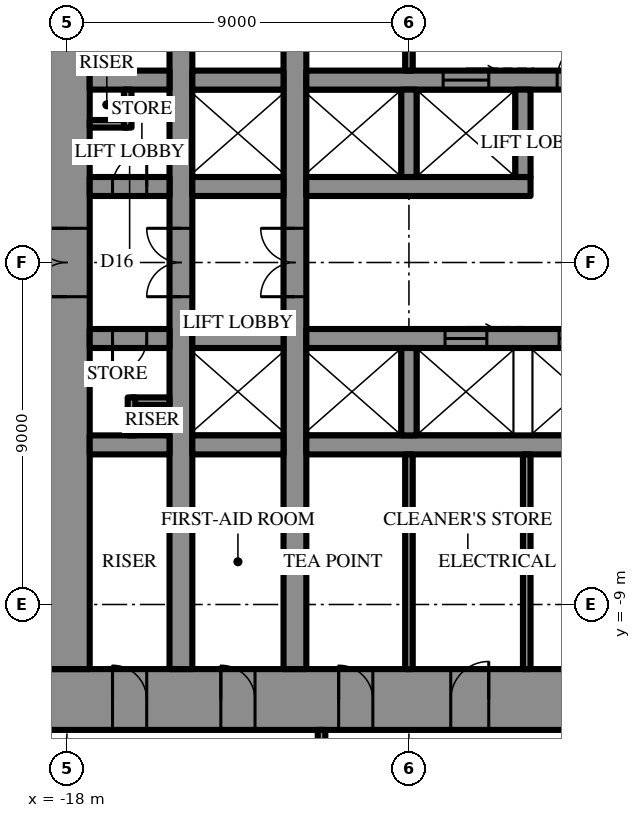
"""IFC4 building model, lengths in metres.
Left out: names, types, materials, properties, quantities, classifications, styles, units other than length and angle.
Written with IfcOpenShell. Run it as: python <this file> out.ifc"""

import sys

from ifc_helpers import new_model, si_unit, direction, frame, frame_2d, origin, place, context, subcontext, project, spatial, rectangle, extrude, element, fill, save


model = new_model("IFC4")
c1 = context("Model", 3, precision=1e-05, world=origin(), true_north=direction((0.0, 1.0)))
c2 = subcontext(c1, "Body", "Model", "MODEL_VIEW")
j1 = project(units=[si_unit("LENGTHUNIT", "METRE"), si_unit("PLANEANGLEUNIT", "RADIAN")], contexts=[c1])
p1 = place(None, origin())
s1 = spatial("IfcSite", under=j1, at=p1, CompositionType="ELEMENT")
p2 = place(p1, origin())
s2 = spatial("IfcBuilding", under=s1, at=p2, CompositionType="ELEMENT")
p3 = place(p2, frame((0.0, 0.0, 186.7)))
s3 = spatial("IfcBuildingStorey", under=s2, at=p3, CompositionType="ELEMENT", Elevation=186.7)
p4 = place(p3, frame((18.6, -11.5, 0.0), z_axis=(0.0, 0.0, 1.0), x_axis=(-1.0, 0.0, 0.0)))
e1 = element("IfcWall", 1, at=p4, inside=s3, PredefinedType="SHEAR", context=c2, shape_type="SweptSolid", body=[
    extrude(rectangle(XDim=37.2, YDim=1.6, at=frame_2d((18.6, 0.0))), origin(), (0.0, 0.0, 1.0), 4.2),
])
p5 = place(p4, frame((19.45, 0.0, 0.0)))
e2 = element("IfcOpeningElement", 2, at=p5, cuts=e1, PredefinedType="OPENING", context=c2, shape_type="SweptSolid", body=[
    extrude(rectangle(XDim=0.9, YDim=2.2, at=frame_2d((0.45, 1.1))), frame((0.0, 0.81, 0.0), z_axis=(0.0, -1.0, 0.0), x_axis=(1.0, 0.0, 0.0)), (0.0, 0.0, 1.0), 1.62),
])
p6 = place(p4, frame((22.45, 0.0, 0.0)))
e3 = element("IfcOpeningElement", 3, at=p6, cuts=e1, PredefinedType="OPENING", context=c2, shape_type="SweptSolid", body=[
    extrude(rectangle(XDim=0.9, YDim=2.2, at=frame_2d((0.45, 1.1))), frame((0.0, 0.81, 0.0), z_axis=(0.0, -1.0, 0.0), x_axis=(1.0, 0.0, 0.0)), (0.0, 0.0, 1.0), 1.62),
])
p7 = place(p4, frame((25.5, 0.0, 0.0)))
e4 = element("IfcOpeningElement", 4, at=p7, cuts=e1, PredefinedType="OPENING", context=c2, shape_type="SweptSolid", body=[
    extrude(rectangle(XDim=1.0, YDim=2.2, at=frame_2d((0.5, 1.1))), frame((0.0, 0.81, 0.0), z_axis=(0.0, -1.0, 0.0), x_axis=(1.0, 0.0, 0.0)), (0.0, 0.0, 1.0), 1.62),
])
p8 = place(p4, frame((1.8, 0.0, 0.0)))
e5 = element("IfcOpeningElement", 5, at=p8, cuts=e1, PredefinedType="OPENING", context=c2, shape_type="SweptSolid", body=[
    extrude(rectangle(XDim=0.9, YDim=2.2, at=frame_2d((0.45, 1.1))), frame((0.0, 0.81, 0.0), z_axis=(0.0, -1.0, 0.0), x_axis=(1.0, 0.0, 0.0)), (0.0, 0.0, 1.0), 1.62),
])
p9 = place(p4, frame((4.65, 0.0, 0.0)))
e6 = element("IfcOpeningElement", 6, at=p9, cuts=e1, PredefinedType="OPENING", context=c2, shape_type="SweptSolid", body=[
    extrude(rectangle(XDim=0.9, YDim=2.2, at=frame_2d((0.45, 1.1))), frame((0.0, 0.81, 0.0), z_axis=(0.0, -1.0, 0.0), x_axis=(1.0, 0.0, 0.0)), (0.0, 0.0, 1.0), 1.62),
])
p10 = place(p4, frame((7.75, 0.0, 0.0)))
e7 = element("IfcOpeningElement", 7, at=p10, cuts=e1, PredefinedType="OPENING", context=c2, shape_type="SweptSolid", body=[
    extrude(rectangle(XDim=0.9, YDim=2.2, at=frame_2d((0.45, 1.1))), frame((0.0, 0.81, 0.0), z_axis=(0.0, -1.0, 0.0), x_axis=(1.0, 0.0, 0.0)), (0.0, 0.0, 1.0), 1.62),
])
p11 = place(p4, frame((28.55, 0.0, 0.0)))
e8 = element("IfcOpeningElement", 8, at=p11, cuts=e1, PredefinedType="OPENING", context=c2, shape_type="SweptSolid", body=[
    extrude(rectangle(XDim=0.9, YDim=2.2, at=frame_2d((0.45, 1.1))), frame((0.0, 0.81, 0.0), z_axis=(0.0, -1.0, 0.0), x_axis=(1.0, 0.0, 0.0)), (0.0, 0.0, 1.0), 1.62),
])
p12 = place(p4, frame((31.65, 0.0, 0.0)))
e9 = element("IfcOpeningElement", 9, at=p12, cuts=e1, PredefinedType="OPENING", context=c2, shape_type="SweptSolid", body=[
    extrude(rectangle(XDim=0.9, YDim=2.2, at=frame_2d((0.45, 1.1))), frame((0.0, 0.81, 0.0), z_axis=(0.0, -1.0, 0.0), x_axis=(1.0, 0.0, 0.0)), (0.0, 0.0, 1.0), 1.62),
])
p13 = place(p4, frame((34.5, 0.0, 0.0)))
e10 = element("IfcOpeningElement", 10, at=p13, cuts=e1, PredefinedType="OPENING", context=c2, shape_type="SweptSolid", body=[
    extrude(rectangle(XDim=0.9, YDim=2.2, at=frame_2d((0.45, 1.1))), frame((0.0, 0.81, 0.0), z_axis=(0.0, -1.0, 0.0), x_axis=(1.0, 0.0, 0.0)), (0.0, 0.0, 1.0), 1.62),
])
p14 = place(p3, frame((-18.0, 10.7, 0.0), z_axis=(0.0, 0.0, 1.0), x_axis=(0.0, -1.0, 0.0)))
e11 = element("IfcWall", 11, at=p14, inside=s3, PredefinedType="SHEAR", context=c2, shape_type="SweptSolid", body=[
    extrude(rectangle(XDim=21.4, YDim=1.2, at=frame_2d((10.7, 0.0))), origin(), (0.0, 0.0, 1.0), 4.2),
])
p15 = place(p14, frame((9.8, 0.0, 0.0)))
e12 = element("IfcOpeningElement", 12, at=p15, cuts=e11, PredefinedType="OPENING", context=c2, shape_type="SweptSolid", body=[
    extrude(rectangle(XDim=1.8, YDim=2.4, at=frame_2d((0.9, 1.2))), frame((0.0, 0.61, 0.0), z_axis=(0.0, -1.0, 0.0), x_axis=(1.0, 0.0, 0.0)), (0.0, 0.0, 1.0), 1.22),
])
p16 = place(p3, frame((-12.0, -10.7, 0.0), z_axis=(0.0, 0.0, 1.0), x_axis=(0.0, 1.0, 0.0)))
e13 = element("IfcWall", 13, at=p16, inside=s3, PredefinedType="SHEAR", context=c2, shape_type="SweptSolid", body=[
    extrude(rectangle(XDim=21.4, YDim=0.6, at=frame_2d((10.7, 0.0))), origin(), (0.0, 0.0, 1.0), 4.2),
])
p17 = place(p16, frame((9.8, 0.0, 0.0)))
e14 = element("IfcOpeningElement", 14, at=p17, cuts=e13, PredefinedType="OPENING", context=c2, shape_type="SweptSolid", body=[
    extrude(rectangle(XDim=1.8, YDim=2.4, at=frame_2d((0.9, 1.2))), frame((0.0, 0.31, 0.0), z_axis=(0.0, -1.0, 0.0), x_axis=(1.0, 0.0, 0.0)), (0.0, 0.0, 1.0), 0.62),
])
p18 = place(p3, frame((-15.0, -10.7, 0.0), z_axis=(0.0, 0.0, 1.0), x_axis=(0.0, 1.0, 0.0)))
e15 = element("IfcWall", 15, at=p18, inside=s3, PredefinedType="SHEAR", context=c2, shape_type="SweptSolid", body=[
    extrude(rectangle(XDim=21.4, YDim=0.6, at=frame_2d((10.7, 0.0))), origin(), (0.0, 0.0, 1.0), 4.2),
])
p19 = place(p18, frame((9.8, 0.0, 0.0)))
e16 = element("IfcOpeningElement", 16, at=p19, cuts=e15, PredefinedType="OPENING", context=c2, shape_type="SweptSolid", body=[
    extrude(rectangle(XDim=1.8, YDim=2.4, at=frame_2d((0.9, 1.2))), frame((0.0, 0.31, 0.0), z_axis=(0.0, -1.0, 0.0), x_axis=(1.0, 0.0, 0.0)), (0.0, 0.0, 1.0), 0.62),
])
p20 = place(p3, frame((-17.4, 2.0, 0.0), z_axis=(0.0, 0.0, 1.0), x_axis=(1.0, 0.0, 0.0)))
e17 = element("IfcWall", 17, at=p20, inside=s3, PredefinedType="SHEAR", context=c2, shape_type="SweptSolid", body=[
    extrude(rectangle(XDim=2.1, YDim=0.5, at=frame_2d((1.05, 0.0))), origin(), (0.0, 0.0, 1.0), 4.2),
])
p21 = place(p20, frame((0.6, 0.0, 0.0)))
e18 = element("IfcOpeningElement", 18, at=p21, cuts=e17, PredefinedType="OPENING", context=c2, shape_type="SweptSolid", body=[
    extrude(rectangle(XDim=0.9, YDim=2.2, at=frame_2d((0.45, 1.1))), frame((0.0, 0.26, 0.0), z_axis=(0.0, -1.0, 0.0), x_axis=(1.0, 0.0, 0.0)), (0.0, 0.0, 1.0), 0.52),
])
p22 = place(p3, frame((-14.7, 2.0, 0.0), z_axis=(0.0, 0.0, 1.0), x_axis=(1.0, 0.0, 0.0)))
e19 = element("IfcWall", 19, at=p22, inside=s3, PredefinedType="SHEAR", context=c2, shape_type="SweptSolid", body=[
    extrude(rectangle(XDim=2.4, YDim=0.5, at=frame_2d((1.2, 0.0))), origin(), (0.0, 0.0, 1.0), 4.2),
])
p23 = place(p3, frame((-11.7, 2.0, 0.0), z_axis=(0.0, 0.0, 1.0), x_axis=(1.0, 0.0, 0.0)))
e20 = element("IfcWall", 20, at=p23, inside=s3, PredefinedType="SHEAR", context=c2, shape_type="SweptSolid", body=[
    extrude(rectangle(XDim=5.9, YDim=0.5, at=frame_2d((2.95, 0.0))), origin(), (0.0, 0.0, 1.0), 4.2),
])
p24 = place(p3, frame((-17.4, 4.8, 0.0), z_axis=(0.0, 0.0, 1.0), x_axis=(1.0, 0.0, 0.0)))
e21 = element("IfcWall", 21, at=p24, inside=s3, PredefinedType="SHEAR", context=c2, shape_type="SweptSolid", body=[
    extrude(rectangle(XDim=2.1, YDim=0.5, at=frame_2d((1.05, 0.0))), origin(), (0.0, 0.0, 1.0), 4.2),
])
p25 = place(p3, frame((-14.7, 4.8, 0.0), z_axis=(0.0, 0.0, 1.0), x_axis=(1.0, 0.0, 0.0)))
e22 = element("IfcWall", 22, at=p25, inside=s3, PredefinedType="SHEAR", context=c2, shape_type="SweptSolid", body=[
    extrude(rectangle(XDim=2.4, YDim=0.5, at=frame_2d((1.2, 0.0))), origin(), (0.0, 0.0, 1.0), 4.2),
])
p26 = place(p3, frame((-11.7, 4.8, 0.0), z_axis=(0.0, 0.0, 1.0), x_axis=(1.0, 0.0, 0.0)))
e23 = element("IfcWall", 23, at=p26, inside=s3, PredefinedType="SHEAR", context=c2, shape_type="SweptSolid", body=[
    extrude(rectangle(XDim=23.4, YDim=0.5, at=frame_2d((11.7, 0.0))), origin(), (0.0, 0.0, 1.0), 4.2),
])
p27 = place(p26, frame((6.6, 0.0, 0.0)))
e24 = element("IfcOpeningElement", 24, at=p27, cuts=e23, PredefinedType="OPENING", context=c2, shape_type="SweptSolid", body=[
    extrude(rectangle(XDim=1.2, YDim=2.2, at=frame_2d((0.6, 1.1))), frame((0.0, 0.26, 0.0), z_axis=(0.0, -1.0, 0.0), x_axis=(1.0, 0.0, 0.0)), (0.0, 0.0, 1.0), 0.52),
])
p28 = place(p26, frame((3.6, 0.0, 0.0)))
e25 = element("IfcOpeningElement", 25, at=p28, cuts=e23, PredefinedType="OPENING", context=c2, shape_type="SweptSolid", body=[
    extrude(rectangle(XDim=1.2, YDim=2.2, at=frame_2d((0.6, 1.1))), frame((0.0, 0.26, 0.0), z_axis=(0.0, -1.0, 0.0), x_axis=(1.0, 0.0, 0.0)), (0.0, 0.0, 1.0), 0.52),
])
for number, where, z_axis, x_axis in (
    (26, (-9.0, 2.25, 0.0), (0.0, 0.0, 1.0), (0.0, 1.0, 0.0)),
    (27, (-6.0, 2.25, 0.0), (0.0, 0.0, 1.0), (0.0, 1.0, 0.0)),
):
    element("IfcWall", number, at=place(p3, frame(where, z_axis=z_axis, x_axis=x_axis)), inside=s3, PredefinedType="SHEAR", context=c2, shape_type="SweptSolid", body=[
        extrude(rectangle(XDim=2.3, YDim=0.4, at=frame_2d((1.15, 0.0))), origin(), (0.0, 0.0, 1.0), 4.2),
    ])
p29 = place(p3, frame((3.2, -2.0, 0.0), z_axis=(0.0, 0.0, 1.0), x_axis=(-1.0, 0.0, 0.0)))
e28 = element("IfcWall", 28, at=p29, inside=s3, PredefinedType="SHEAR", context=c2, shape_type="SweptSolid", body=[
    extrude(rectangle(XDim=14.9, YDim=0.5, at=frame_2d((7.45, 0.0))), origin(), (0.0, 0.0, 1.0), 4.2),
])
p30 = place(p29, frame((1.15, 0.0, 0.0)))
e29 = element("IfcOpeningElement", 29, at=p30, cuts=e28, PredefinedType="OPENING", context=c2, shape_type="SweptSolid", body=[
    extrude(rectangle(XDim=1.1, YDim=2.2, at=frame_2d((0.55, 1.1))), frame((0.0, 0.26, 0.0), z_axis=(0.0, -1.0, 0.0), x_axis=(1.0, 0.0, 0.0)), (0.0, 0.0, 1.0), 0.52),
])
p31 = place(p29, frame((4.15, 0.0, 0.0)))
e30 = element("IfcOpeningElement", 30, at=p31, cuts=e28, PredefinedType="OPENING", context=c2, shape_type="SweptSolid", body=[
    extrude(rectangle(XDim=1.1, YDim=2.2, at=frame_2d((0.55, 1.1))), frame((0.0, 0.26, 0.0), z_axis=(0.0, -1.0, 0.0), x_axis=(1.0, 0.0, 0.0)), (0.0, 0.0, 1.0), 0.52),
])
p32 = place(p29, frame((7.15, 0.0, 0.0)))
e31 = element("IfcOpeningElement", 31, at=p32, cuts=e28, PredefinedType="OPENING", context=c2, shape_type="SweptSolid", body=[
    extrude(rectangle(XDim=1.1, YDim=2.2, at=frame_2d((0.55, 1.1))), frame((0.0, 0.26, 0.0), z_axis=(0.0, -1.0, 0.0), x_axis=(1.0, 0.0, 0.0)), (0.0, 0.0, 1.0), 0.52),
])
p33 = place(p29, frame((10.15, 0.0, 0.0)))
e32 = element("IfcOpeningElement", 32, at=p33, cuts=e28, PredefinedType="OPENING", context=c2, shape_type="SweptSolid", body=[
    extrude(rectangle(XDim=1.1, YDim=2.2, at=frame_2d((0.55, 1.1))), frame((0.0, 0.26, 0.0), z_axis=(0.0, -1.0, 0.0), x_axis=(1.0, 0.0, 0.0)), (0.0, 0.0, 1.0), 0.52),
])
p34 = place(p3, frame((-12.3, -2.0, 0.0), z_axis=(0.0, 0.0, 1.0), x_axis=(-1.0, 0.0, 0.0)))
e33 = element("IfcWall", 33, at=p34, inside=s3, PredefinedType="SHEAR", context=c2, shape_type="SweptSolid", body=[
    extrude(rectangle(XDim=2.4, YDim=0.5, at=frame_2d((1.2, 0.0))), origin(), (0.0, 0.0, 1.0), 4.2),
])
p35 = place(p3, frame((-15.3, -2.0, 0.0), z_axis=(0.0, 0.0, 1.0), x_axis=(-1.0, 0.0, 0.0)))
e34 = element("IfcWall", 34, at=p35, inside=s3, PredefinedType="SHEAR", context=c2, shape_type="SweptSolid", body=[
    extrude(rectangle(XDim=2.1, YDim=0.5, at=frame_2d((1.05, 0.0))), origin(), (0.0, 0.0, 1.0), 4.2),
])
p36 = place(p35, frame((0.6, 0.0, 0.0)))
e35 = element("IfcOpeningElement", 35, at=p36, cuts=e34, PredefinedType="OPENING", context=c2, shape_type="SweptSolid", body=[
    extrude(rectangle(XDim=0.9, YDim=2.2, at=frame_2d((0.45, 1.1))), frame((0.0, 0.26, 0.0), z_axis=(0.0, -1.0, 0.0), x_axis=(1.0, 0.0, 0.0)), (0.0, 0.0, 1.0), 0.52),
])
p37 = place(p3, frame((11.7, -4.8, 0.0), z_axis=(0.0, 0.0, 1.0), x_axis=(-1.0, 0.0, 0.0)))
e36 = element("IfcWall", 36, at=p37, inside=s3, PredefinedType="SHEAR", context=c2, shape_type="SweptSolid", body=[
    extrude(rectangle(XDim=23.4, YDim=0.5, at=frame_2d((11.7, 0.0))), origin(), (0.0, 0.0, 1.0), 4.2),
])
p38 = place(p37, frame((6.6, 0.0, 0.0)))
e37 = element("IfcOpeningElement", 37, at=p38, cuts=e36, PredefinedType="OPENING", context=c2, shape_type="SweptSolid", body=[
    extrude(rectangle(XDim=1.2, YDim=2.2, at=frame_2d((0.6, 1.1))), frame((0.0, 0.26, 0.0), z_axis=(0.0, -1.0, 0.0), x_axis=(1.0, 0.0, 0.0)), (0.0, 0.0, 1.0), 0.52),
])
p39 = place(p37, frame((3.6, 0.0, 0.0)))
e38 = element("IfcOpeningElement", 38, at=p39, cuts=e36, PredefinedType="OPENING", context=c2, shape_type="SweptSolid", body=[
    extrude(rectangle(XDim=1.2, YDim=2.2, at=frame_2d((0.6, 1.1))), frame((0.0, 0.26, 0.0), z_axis=(0.0, -1.0, 0.0), x_axis=(1.0, 0.0, 0.0)), (0.0, 0.0, 1.0), 0.52),
])
p40 = place(p3, frame((-12.3, -4.8, 0.0), z_axis=(0.0, 0.0, 1.0), x_axis=(-1.0, 0.0, 0.0)))
e39 = element("IfcWall", 39, at=p40, inside=s3, PredefinedType="SHEAR", context=c2, shape_type="SweptSolid", body=[
    extrude(rectangle(XDim=2.4, YDim=0.5, at=frame_2d((1.2, 0.0))), origin(), (0.0, 0.0, 1.0), 4.2),
])
p41 = place(p3, frame((-15.3, -4.8, 0.0), z_axis=(0.0, 0.0, 1.0), x_axis=(-1.0, 0.0, 0.0)))
e40 = element("IfcWall", 40, at=p41, inside=s3, PredefinedType="SHEAR", context=c2, shape_type="SweptSolid", body=[
    extrude(rectangle(XDim=2.1, YDim=0.5, at=frame_2d((1.05, 0.0))), origin(), (0.0, 0.0, 1.0), 4.2),
])
p42 = place(p3, frame((-9.0, -2.25, 0.0), z_axis=(0.0, 0.0, 1.0), x_axis=(0.0, -1.0, 0.0)))
e41 = element("IfcWall", 41, at=p42, inside=s3, PredefinedType="SHEAR", context=c2, shape_type="SweptSolid", body=[
    extrude(rectangle(XDim=2.3, YDim=0.4, at=frame_2d((1.15, 0.0))), origin(), (0.0, 0.0, 1.0), 4.2),
])
for number, where, z_axis, x_axis in (
    (42, (-9.0, 5.05, 0.0), (0.0, 0.0, 1.0), (0.0, 1.0, 0.0)),
    (43, (-9.0, -5.05, 0.0), (0.0, 0.0, 1.0), (0.0, -1.0, 0.0)),
    (44, (-5.9, -5.05, 0.0), (0.0, 0.0, 1.0), (0.0, -1.0, 0.0)),
):
    element("IfcWall", number, at=place(p3, frame(where, z_axis=z_axis, x_axis=x_axis)), inside=s3, PredefinedType="PARTITIONING", context=c2, shape_type="SweptSolid", body=[
        extrude(rectangle(XDim=5.65, YDim=0.2, at=frame_2d((2.825, 0.0))), origin(), (0.0, 0.0, 1.0), 4.0),
    ])
for number, where, z_axis, x_axis in (
    (45, (-17.4, 3.65, 0.0), (0.0, 0.0, 1.0), (1.0, 0.0, 0.0)),
    (46, (-16.4, 3.55, 0.0), (0.0, 0.0, 1.0), (0.0, 1.0, 0.0)),
    (47, (-15.3, -3.65, 0.0), (0.0, 0.0, 1.0), (-1.0, 0.0, 0.0)),
    (48, (-16.3, -3.55, 0.0), (0.0, 0.0, 1.0), (0.0, -1.0, 0.0)),
):
    element("IfcWall", number, at=place(p3, frame(where, z_axis=z_axis, x_axis=x_axis)), inside=s3, PredefinedType="PARTITIONING", context=c2, shape_type="SweptSolid", body=[
        extrude(rectangle(XDim=1.0, YDim=0.2, at=frame_2d((0.5, 0.0))), origin(), (0.0, 0.0, 1.0), 4.0),
    ])
p43 = place(p3, frame((-11.3, -12.3, 0.0), z_axis=(0.0, 0.0, 1.0), x_axis=(0.0, -1.0, 0.0)))
e49 = element("IfcWall", 49, at=p43, inside=s3, PredefinedType="PARTITIONING", context=c2, shape_type="SweptSolid", body=[
    extrude(rectangle(XDim=19.0, YDim=0.2, at=frame_2d((9.5, 0.0))), origin(), (0.0, 0.0, 1.0), 4.0),
])
p44 = place(p43, frame((1.4, 0.0, 0.0)))
e50 = element("IfcOpeningElement", 50, at=p44, cuts=e49, PredefinedType="OPENING", context=c2, shape_type="SweptSolid", body=[
    extrude(rectangle(XDim=1.0, YDim=2.2, at=frame_2d((0.5, 1.1))), frame((0.0, 0.11, 0.0), z_axis=(0.0, -1.0, 0.0), x_axis=(1.0, 0.0, 0.0)), (0.0, 0.0, 1.0), 0.22),
])
p45 = place(p15, frame((1.8, 0.0, 0.0), z_axis=(0.0, 0.0, 1.0), x_axis=(-1.0, 0.0, 0.0)))
e51 = element("IfcDoor", 51, at=p45, inside=s3, OperationType="DOUBLE_DOOR_SINGLE_SWING", PredefinedType="DOOR", context=c2, shape_type="SweptSolid", body=[
    extrude(rectangle(XDim=1.8, YDim=2.4, at=frame_2d((0.9, 1.2))), frame((0.0, 0.025, 0.0), z_axis=(0.0, -1.0, 0.0), x_axis=(1.0, 0.0, 0.0)), (0.0, 0.0, 1.0), 0.05),
])
fill(e12, e51)
p46 = place(p27, origin())
e52 = element("IfcDoor", 52, at=p46, inside=s3, OperationType="SINGLE_SWING_LEFT", PredefinedType="DOOR", context=c2, shape_type="SweptSolid", body=[
    extrude(rectangle(XDim=1.2, YDim=2.2, at=frame_2d((0.6, 1.1))), frame((0.0, 0.025, 0.0), z_axis=(0.0, -1.0, 0.0), x_axis=(1.0, 0.0, 0.0)), (0.0, 0.0, 1.0), 0.05),
])
fill(e24, e52)
p47 = place(p7, frame((1.0, 0.0, 0.0), z_axis=(0.0, 0.0, 1.0), x_axis=(-1.0, 0.0, 0.0)))
e53 = element("IfcDoor", 53, at=p47, inside=s3, OperationType="SINGLE_SWING_LEFT", PredefinedType="DOOR", context=c2, shape_type="SweptSolid", body=[
    extrude(rectangle(XDim=1.0, YDim=2.2, at=frame_2d((0.5, 1.1))), frame((0.0, 0.025, 0.0), z_axis=(0.0, -1.0, 0.0), x_axis=(1.0, 0.0, 0.0)), (0.0, 0.0, 1.0), 0.05),
])
fill(e4, e53)
p48 = place(p11, frame((0.9, 0.0, 0.0), z_axis=(0.0, 0.0, 1.0), x_axis=(-1.0, 0.0, 0.0)))
e54 = element("IfcDoor", 54, at=p48, inside=s3, OperationType="SINGLE_SWING_RIGHT", PredefinedType="DOOR", context=c2, shape_type="SweptSolid", body=[
    extrude(rectangle(XDim=0.9, YDim=2.2, at=frame_2d((0.45, 1.1))), frame((0.0, 0.025, 0.0), z_axis=(0.0, -1.0, 0.0), x_axis=(1.0, 0.0, 0.0)), (0.0, 0.0, 1.0), 0.05),
])
fill(e8, e54)
p49 = place(p12, frame((0.9, 0.0, 0.0), z_axis=(0.0, 0.0, 1.0), x_axis=(-1.0, 0.0, 0.0)))
e55 = element("IfcDoor", 55, at=p49, inside=s3, OperationType="SINGLE_SWING_RIGHT", PredefinedType="DOOR", context=c2, shape_type="SweptSolid", body=[
    extrude(rectangle(XDim=0.9, YDim=2.2, at=frame_2d((0.45, 1.1))), frame((0.0, 0.025, 0.0), z_axis=(0.0, -1.0, 0.0), x_axis=(1.0, 0.0, 0.0)), (0.0, 0.0, 1.0), 0.05),
])
fill(e9, e55)
p50 = place(p13, frame((0.9, 0.0, 0.0), z_axis=(0.0, 0.0, 1.0), x_axis=(-1.0, 0.0, 0.0)))
e56 = element("IfcDoor", 56, at=p50, inside=s3, OperationType="SINGLE_SWING_RIGHT", PredefinedType="DOOR", context=c2, shape_type="SweptSolid", body=[
    extrude(rectangle(XDim=0.9, YDim=2.2, at=frame_2d((0.45, 1.1))), frame((0.0, 0.025, 0.0), z_axis=(0.0, -1.0, 0.0), x_axis=(1.0, 0.0, 0.0)), (0.0, 0.0, 1.0), 0.05),
])
fill(e10, e56)
p51 = place(p21, origin())
e57 = element("IfcDoor", 57, at=p51, inside=s3, OperationType="SINGLE_SWING_LEFT", PredefinedType="DOOR", context=c2, shape_type="SweptSolid", body=[
    extrude(rectangle(XDim=0.9, YDim=2.2, at=frame_2d((0.45, 1.1))), frame((0.0, 0.025, 0.0), z_axis=(0.0, -1.0, 0.0), x_axis=(1.0, 0.0, 0.0)), (0.0, 0.0, 1.0), 0.05),
])
fill(e18, e57)
p52 = place(p36, origin())
e58 = element("IfcDoor", 58, at=p52, inside=s3, OperationType="SINGLE_SWING_LEFT", PredefinedType="DOOR", context=c2, shape_type="SweptSolid", body=[
    extrude(rectangle(XDim=0.9, YDim=2.2, at=frame_2d((0.45, 1.1))), frame((0.0, 0.025, 0.0), z_axis=(0.0, -1.0, 0.0), x_axis=(1.0, 0.0, 0.0)), (0.0, 0.0, 1.0), 0.05),
])
fill(e35, e58)
p53 = place(p17, origin())
e59 = element("IfcDoor", 59, at=p53, inside=s3, OperationType="DOUBLE_DOOR_SINGLE_SWING", PredefinedType="DOOR", context=c2, shape_type="SweptSolid", body=[
    extrude(rectangle(XDim=1.8, YDim=2.4, at=frame_2d((0.9, 1.2))), frame((0.0, 0.025, 0.0), z_axis=(0.0, -1.0, 0.0), x_axis=(1.0, 0.0, 0.0)), (0.0, 0.0, 1.0), 0.05),
])
fill(e14, e59)
p54 = place(p19, origin())
e60 = element("IfcDoor", 60, at=p54, inside=s3, OperationType="DOUBLE_DOOR_SINGLE_SWING", PredefinedType="DOOR", context=c2, shape_type="SweptSolid", body=[
    extrude(rectangle(XDim=1.8, YDim=2.4, at=frame_2d((0.9, 1.2))), frame((0.0, 0.025, 0.0), z_axis=(0.0, -1.0, 0.0), x_axis=(1.0, 0.0, 0.0)), (0.0, 0.0, 1.0), 0.05),
])
fill(e16, e60)
p55 = place(p28, origin())
e61 = element("IfcDoor", 61, at=p55, inside=s3, OperationType="SLIDING_TO_LEFT", PredefinedType="DOOR", context=c2, shape_type="SweptSolid", body=[
    extrude(rectangle(XDim=1.2, YDim=2.2, at=frame_2d((0.6, 1.1))), frame((0.0, 0.025, 0.0), z_axis=(0.0, -1.0, 0.0), x_axis=(1.0, 0.0, 0.0)), (0.0, 0.0, 1.0), 0.05),
])
fill(e25, e61)
p56 = place(p32, frame((1.1, 0.0, 0.0), z_axis=(0.0, 0.0, 1.0), x_axis=(-1.0, 0.0, 0.0)))
e62 = element("IfcDoor", 62, at=p56, inside=s3, OperationType="SLIDING_TO_LEFT", PredefinedType="DOOR", context=c2, shape_type="SweptSolid", body=[
    extrude(rectangle(XDim=1.1, YDim=2.2, at=frame_2d((0.55, 1.1))), frame((0.0, 0.025, 0.0), z_axis=(0.0, -1.0, 0.0), x_axis=(1.0, 0.0, 0.0)), (0.0, 0.0, 1.0), 0.05),
])
fill(e31, e62)
p57 = place(p33, frame((1.1, 0.0, 0.0), z_axis=(0.0, 0.0, 1.0), x_axis=(-1.0, 0.0, 0.0)))
e63 = element("IfcDoor", 63, at=p57, inside=s3, OperationType="SLIDING_TO_LEFT", PredefinedType="DOOR", context=c2, shape_type="SweptSolid", body=[
    extrude(rectangle(XDim=1.1, YDim=2.2, at=frame_2d((0.55, 1.1))), frame((0.0, 0.025, 0.0), z_axis=(0.0, -1.0, 0.0), x_axis=(1.0, 0.0, 0.0)), (0.0, 0.0, 1.0), 0.05),
])
fill(e32, e63)
save(model, sys.argv[1])
